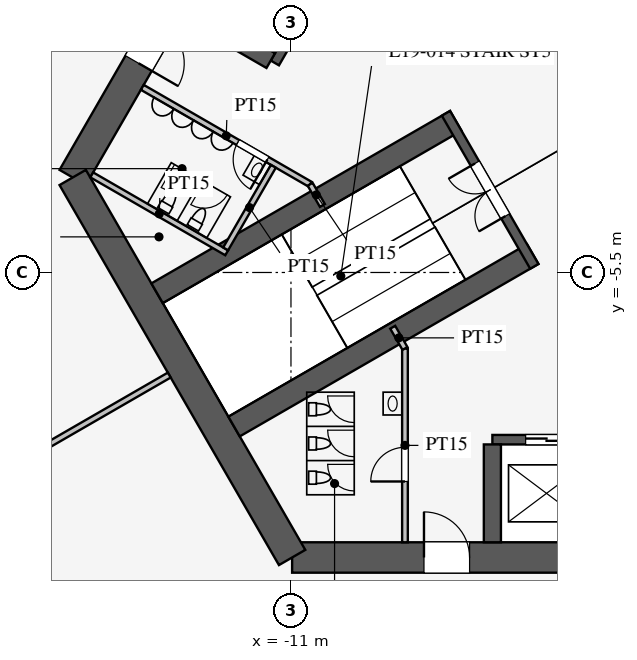
"""IFC4 building model, lengths in metres.
Left out: names, types, materials, properties, quantities, classifications, styles, units other than length and angle.
Written with IfcOpenShell. Run it as: python <this file> out.ifc"""

import sys

from ifc_helpers import new_model, si_unit, direction, frame, frame_2d, origin, place, context, subcontext, project, spatial, rectangle, extrude, element, fill, save


model = new_model("IFC4")
c1 = context("Model", 3, precision=1e-05, world=origin(), true_north=direction((0.0, 1.0)))
c2 = subcontext(c1, "Body", "Model", "MODEL_VIEW")
j1 = project(units=[si_unit("LENGTHUNIT", "METRE"), si_unit("PLANEANGLEUNIT", "RADIAN")], contexts=[c1])
p1 = place(None, origin())
s1 = spatial("IfcSite", under=j1, at=p1, CompositionType="ELEMENT")
p2 = place(p1, origin())
s2 = spatial("IfcBuilding", under=s1, at=p2, CompositionType="ELEMENT")
p3 = place(p2, frame((0.0, 0.0, 83.7)))
s3 = spatial("IfcBuildingStorey", under=s2, at=p3, CompositionType="ELEMENT", Elevation=83.7)
p4 = place(p3, frame((-10.97, -13.0, 0.0), z_axis=(0.0, 0.0, 1.0), x_axis=(1.0, 0.0, 0.0)))
e1 = element("IfcWall", 1, at=p4, inside=s3, PredefinedType="SHEAR", context=c2, shape_type="SweptSolid", body=[
    extrude(rectangle(XDim=21.939, YDim=0.8, at=frame_2d((10.97, 0.0))), origin(), (0.0, 0.0, 1.0), 4.2),
])
p5 = place(p4, frame((17.27, 0.0, 0.0)))
e2 = element("IfcOpeningElement", 2, at=p5, cuts=e1, PredefinedType="OPENING", context=c2, shape_type="SweptSolid", body=[
    extrude(rectangle(XDim=1.2, YDim=2.1, at=frame_2d((0.6, 1.05))), frame((0.0, 0.41, 0.0), z_axis=(0.0, -1.0, 0.0), x_axis=(1.0, 0.0, 0.0)), (0.0, 0.0, 1.0), 0.82),
])
p6 = place(p4, frame((3.47, 0.0, 0.0)))
e3 = element("IfcOpeningElement", 3, at=p6, cuts=e1, PredefinedType="OPENING", context=c2, shape_type="SweptSolid", body=[
    extrude(rectangle(XDim=1.2, YDim=2.1, at=frame_2d((0.6, 1.05))), frame((0.0, 0.41, 0.0), z_axis=(0.0, -1.0, 0.0), x_axis=(1.0, 0.0, 0.0)), (0.0, 0.0, 1.0), 0.82),
])
p7 = place(p3, frame((-5.773, 16.0, 0.0), z_axis=(0.0, 0.0, 1.0), x_axis=(-0.500002442456, -0.866023993627, 0.0)))
e4 = element("IfcWall", 4, at=p7, inside=s3, PredefinedType="SHEAR", context=c2, shape_type="SweptSolid", body=[
    extrude(rectangle(XDim=21.939, YDim=0.8, at=frame_2d((10.97, 0.0))), origin(), (0.0, 0.0, 1.0), 4.2),
])
p8 = place(p7, frame((17.27, 0.0, 0.0)))
e5 = element("IfcOpeningElement", 5, at=p8, cuts=e4, PredefinedType="OPENING", context=c2, shape_type="SweptSolid", body=[
    extrude(rectangle(XDim=1.2, YDim=2.1, at=frame_2d((0.6, 1.05))), frame((0.0, 0.41, 0.0), z_axis=(0.0, -1.0, 0.0), x_axis=(1.0, 0.0, 0.0)), (0.0, 0.0, 1.0), 0.82),
])
p9 = place(p7, frame((3.47, 0.0, 0.0)))
e6 = element("IfcOpeningElement", 6, at=p9, cuts=e4, PredefinedType="OPENING", context=c2, shape_type="SweptSolid", body=[
    extrude(rectangle(XDim=1.2, YDim=2.1, at=frame_2d((0.6, 1.05))), frame((0.0, 0.41, 0.0), z_axis=(0.0, -1.0, 0.0), x_axis=(1.0, 0.0, 0.0)), (0.0, 0.0, 1.0), 0.82),
])
p10 = place(p3, frame((-16.743, -3.0, 0.0), z_axis=(0.0, 0.0, 1.0), x_axis=(0.499995765644, -0.866027848477, 0.0)))
e7 = element("IfcWall", 7, at=p10, inside=s3, PredefinedType="SHEAR", context=c2, shape_type="SweptSolid", body=[
    extrude(rectangle(XDim=11.547, YDim=0.8, at=frame_2d((5.773, 0.0))), origin(), (0.0, 0.0, 1.0), 4.2),
])
p11 = place(p3, frame((-5.7, -9.9, 0.0), z_axis=(0.0, 0.0, 1.0), x_axis=(1.0, 0.0, 0.0)))
e8 = element("IfcWall", 8, at=p11, inside=s3, PredefinedType="SHEAR", context=c2, shape_type="SweptSolid", body=[
    extrude(rectangle(XDim=11.4, YDim=0.25, at=frame_2d((5.7, 0.0))), origin(), (0.0, 0.0, 1.0), 4.2),
])
p12 = place(p11, frame((0.875, 0.0, 0.0)))
e9 = element("IfcOpeningElement", 9, at=p12, cuts=e8, PredefinedType="OPENING", context=c2, shape_type="SweptSolid", body=[
    extrude(rectangle(XDim=1.1, YDim=2.2, at=frame_2d((0.55, 1.1))), frame((0.0, 0.135, 0.0), z_axis=(0.0, -1.0, 0.0), x_axis=(1.0, 0.0, 0.0)), (0.0, 0.0, 1.0), 0.27),
])
p13 = place(p11, frame((3.725, 0.0, 0.0)))
e10 = element("IfcOpeningElement", 10, at=p13, cuts=e8, PredefinedType="OPENING", context=c2, shape_type="SweptSolid", body=[
    extrude(rectangle(XDim=1.1, YDim=2.2, at=frame_2d((0.55, 1.1))), frame((0.0, 0.135, 0.0), z_axis=(0.0, -1.0, 0.0), x_axis=(1.0, 0.0, 0.0)), (0.0, 0.0, 1.0), 0.27),
])
p14 = place(p11, frame((6.575, 0.0, 0.0)))
e11 = element("IfcOpeningElement", 11, at=p14, cuts=e8, PredefinedType="OPENING", context=c2, shape_type="SweptSolid", body=[
    extrude(rectangle(XDim=1.1, YDim=2.2, at=frame_2d((0.55, 1.1))), frame((0.0, 0.135, 0.0), z_axis=(0.0, -1.0, 0.0), x_axis=(1.0, 0.0, 0.0)), (0.0, 0.0, 1.0), 0.27),
])
p15 = place(p11, frame((9.425, 0.0, 0.0)))
e12 = element("IfcOpeningElement", 12, at=p15, cuts=e8, PredefinedType="OPENING", context=c2, shape_type="SweptSolid", body=[
    extrude(rectangle(XDim=1.1, YDim=2.2, at=frame_2d((0.55, 1.1))), frame((0.0, 0.135, 0.0), z_axis=(0.0, -1.0, 0.0), x_axis=(1.0, 0.0, 0.0)), (0.0, 0.0, 1.0), 0.27),
])
p16 = place(p3, frame((-5.7, -10.025, 0.0), z_axis=(0.0, 0.0, 1.0), x_axis=(0.0, -1.0, 0.0)))
e13 = element("IfcWall", 13, at=p16, inside=s3, PredefinedType="SHEAR", context=c2, shape_type="SweptSolid", body=[
    extrude(rectangle(XDim=2.575, YDim=0.45, at=frame_2d((1.288, 0.0))), origin(), (0.0, 0.0, 1.0), 4.2),
])
p17 = place(p3, frame((-5.724, 9.886, 0.0), z_axis=(0.0, 0.0, 1.0), x_axis=(-0.500001763848, -0.866024385424, 0.0)))
e14 = element("IfcWall", 14, at=p17, inside=s3, PredefinedType="SHEAR", context=c2, shape_type="SweptSolid", body=[
    extrude(rectangle(XDim=11.4, YDim=0.25, at=frame_2d((5.7, 0.0))), origin(), (0.0, 0.0, 1.0), 4.2),
])
p18 = place(p17, frame((6.525, 0.0, 0.0)))
e15 = element("IfcOpeningElement", 15, at=p18, cuts=e14, PredefinedType="OPENING", context=c2, shape_type="SweptSolid", body=[
    extrude(rectangle(XDim=1.2, YDim=2.2, at=frame_2d((0.6, 1.1))), frame((0.0, 0.135, 0.0), z_axis=(0.0, -1.0, 0.0), x_axis=(1.0, 0.0, 0.0)), (0.0, 0.0, 1.0), 0.27),
])
p19 = place(p17, frame((9.375, 0.0, 0.0)))
e16 = element("IfcOpeningElement", 16, at=p19, cuts=e14, PredefinedType="OPENING", context=c2, shape_type="SweptSolid", body=[
    extrude(rectangle(XDim=1.2, YDim=2.2, at=frame_2d((0.6, 1.1))), frame((0.0, 0.135, 0.0), z_axis=(0.0, -1.0, 0.0), x_axis=(1.0, 0.0, 0.0)), (0.0, 0.0, 1.0), 0.27),
])
p20 = place(p3, frame((-11.532, 0.076, 0.0), z_axis=(0.0, 0.0, 1.0), x_axis=(-0.866005588531, 0.500034319456, 0.0)))
e17 = element("IfcWall", 17, at=p20, inside=s3, PredefinedType="SHEAR", context=c2, shape_type="SweptSolid", body=[
    extrude(rectangle(XDim=2.575, YDim=0.45, at=frame_2d((1.288, 0.0))), origin(), (0.0, 0.0, 1.0), 4.2),
])
for number, where, z_axis, x_axis in (
    (18, (-6.663, -1.509, 0.0), (0.0, 0.0, 1.0), (-0.866, -0.5, 0.0)),
    (19, (-4.638, -5.016, 0.0), (0.0, 0.0, 1.0), (-0.866, -0.5, 0.0)),
):
    element("IfcWall", number, at=place(p3, frame(where, z_axis=z_axis, x_axis=x_axis)), inside=s3, PredefinedType="SHEAR", context=c2, shape_type="SweptSolid", body=[
        extrude(rectangle(XDim=9.075, YDim=0.6, at=frame_2d((4.538, 0.0))), origin(), (0.0, 0.0, 1.0), 4.2),
    ])
p21 = place(p3, frame((-6.922, -1.312, 0.0), z_axis=(0.0, 0.0, 1.0), x_axis=(0.499984536904, -0.866034331223, 0.0)))
e20 = element("IfcWall", 20, at=p21, inside=s3, PredefinedType="SHEAR", context=c2, shape_type="SweptSolid", body=[
    extrude(rectangle(XDim=4.65, YDim=0.25, at=frame_2d((2.325, 0.0))), origin(), (0.0, 0.0, 1.0), 4.2),
])
p22 = place(p21, frame((1.525, 0.0, 0.0)))
e21 = element("IfcOpeningElement", 21, at=p22, cuts=e20, PredefinedType="OPENING", context=c2, shape_type="SweptSolid", body=[
    extrude(rectangle(XDim=1.6, YDim=2.1, at=frame_2d((0.8, 1.05))), frame((0.0, 0.135, 0.0), z_axis=(0.0, -1.0, 0.0), x_axis=(1.0, 0.0, 0.0)), (0.0, 0.0, 1.0), 0.27),
])
p23 = place(p3, frame((-8.0, -7.5, 0.0), z_axis=(0.0, 0.0, 1.0), x_axis=(0.0, -1.0, 0.0)))
e22 = element("IfcWall", 22, at=p23, inside=s3, PredefinedType="PARTITIONING", context=c2, shape_type="SweptSolid", body=[
    extrude(rectangle(XDim=5.1, YDim=0.15, at=frame_2d((2.55, 0.0))), origin(), (0.0, 0.0, 1.0), 4.0),
])
p24 = place(p23, frame((2.6, 0.0, 0.0)))
e23 = element("IfcOpeningElement", 23, at=p24, cuts=e22, PredefinedType="OPENING", context=c2, shape_type="SweptSolid", body=[
    extrude(rectangle(XDim=0.9, YDim=2.1, at=frame_2d((0.45, 1.05))), frame((0.0, 0.085, 0.0), z_axis=(0.0, -1.0, 0.0), x_axis=(1.0, 0.0, 0.0)), (0.0, 0.0, 1.0), 0.17),
])
p25 = place(p3, frame((-10.495, -3.178, 0.0), z_axis=(0.0, 0.0, 1.0), x_axis=(-0.86602216432, 0.500005610874, 0.0)))
e24 = element("IfcWall", 24, at=p25, inside=s3, PredefinedType="PARTITIONING", context=c2, shape_type="SweptSolid", body=[
    extrude(rectangle(XDim=5.1, YDim=0.15, at=frame_2d((2.55, 0.0))), origin(), (0.0, 0.0, 1.0), 4.0),
])
p26 = place(p25, frame((1.3, 0.0, 0.0)))
e25 = element("IfcOpeningElement", 25, at=p26, cuts=e24, PredefinedType="OPENING", context=c2, shape_type="SweptSolid", body=[
    extrude(rectangle(XDim=0.9, YDim=2.1, at=frame_2d((0.45, 1.05))), frame((0.0, 0.085, 0.0), z_axis=(0.0, -1.0, 0.0), x_axis=(1.0, 0.0, 0.0)), (0.0, 0.0, 1.0), 0.17),
])
for number, where, z_axis, x_axis in (
    (26, (-10.495, -3.178, 0.0), (0.0, 0.0, 1.0), (0.5, -0.866, 0.0)),
    (27, (-8.0, -7.5, 0.0), (0.0, 0.0, 1.0), (-0.5, 0.866, 0.0)),
):
    element("IfcWall", number, at=place(p3, frame(where, z_axis=z_axis, x_axis=x_axis)), inside=s3, PredefinedType="PARTITIONING", context=c2, shape_type="SweptSolid", body=[
        extrude(rectangle(XDim=0.645, YDim=0.15, at=frame_2d((0.323, 0.0))), origin(), (0.0, 0.0, 1.0), 4.0),
    ])
p27 = place(p3, frame((-12.691, -4.982, 0.0), z_axis=(0.0, 0.0, 1.0), x_axis=(-0.8660249478, 0.500000789788, 0.0)))
e28 = element("IfcWall", 28, at=p27, inside=s3, PredefinedType="PARTITIONING", context=c2, shape_type="SweptSolid", body=[
    extrude(rectangle(XDim=4.1, YDim=0.15, at=frame_2d((2.05, 0.0))), origin(), (0.0, 0.0, 1.0), 4.0),
])
p28 = place(p3, frame((-11.464, -2.706, 0.0), z_axis=(0.0, 0.0, 1.0), x_axis=(-0.50001992892, -0.866013897511, 0.0)))
e29 = element("IfcWall", 29, at=p28, inside=s3, PredefinedType="PARTITIONING", context=c2, shape_type="SweptSolid", body=[
    extrude(rectangle(XDim=2.51, YDim=0.15, at=frame_2d((1.255, 0.0))), origin(), (0.0, 0.0, 1.0), 4.0),
])
p29 = place(p3, frame((-14.203, -8.2, 0.0), z_axis=(0.0, 0.0, 1.0), x_axis=(-0.866024965723, -0.500000758745, 0.0)))
e30 = element("IfcWall", 30, at=p29, inside=s3, PredefinedType="PARTITIONING", context=c2, shape_type="SweptSolid", body=[
    extrude(rectangle(XDim=18.25, YDim=0.15, at=frame_2d((9.125, 0.0))), origin(), (0.0, 0.0, 1.0), 2.3),
])
p30 = place(p24, frame((0.9, 0.0, 0.0), z_axis=(0.0, 0.0, 1.0), x_axis=(-1.0, 0.0, 0.0)))
e31 = element("IfcDoor", 31, at=p30, inside=s3, OperationType="SINGLE_SWING_LEFT", PredefinedType="DOOR", context=c2, shape_type="SweptSolid", body=[
    extrude(rectangle(XDim=0.9, YDim=2.1, at=frame_2d((0.45, 1.05))), frame((0.0, 0.025, 0.0), z_axis=(0.0, -1.0, 0.0), x_axis=(1.0, 0.0, 0.0)), (0.0, 0.0, 1.0), 0.05),
])
fill(e23, e31)
p31 = place(p26, origin())
e32 = element("IfcDoor", 32, at=p31, inside=s3, OperationType="SINGLE_SWING_LEFT", PredefinedType="DOOR", context=c2, shape_type="SweptSolid", body=[
    extrude(rectangle(XDim=0.9, YDim=2.1, at=frame_2d((0.45, 1.05))), frame((0.0, 0.025, 0.0), z_axis=(0.0, -1.0, 0.0), x_axis=(1.0, 0.0, 0.0)), (0.0, 0.0, 1.0), 0.05),
])
fill(e25, e32)
p32 = place(p22, frame((1.6, 0.0, 0.0), z_axis=(0.0, 0.0, 1.0), x_axis=(-1.0, 0.0, 0.0)))
e33 = element("IfcDoor", 33, at=p32, inside=s3, OperationType="DOUBLE_DOOR_SINGLE_SWING", PredefinedType="DOOR", context=c2, shape_type="SweptSolid", body=[
    extrude(rectangle(XDim=1.6, YDim=2.1, at=frame_2d((0.8, 1.05))), frame((0.0, 0.025, 0.0), z_axis=(0.0, -1.0, 0.0), x_axis=(1.0, 0.0, 0.0)), (0.0, 0.0, 1.0), 0.05),
])
fill(e21, e33)
p33 = place(p6, origin())
e34 = element("IfcDoor", 34, at=p33, inside=s3, OperationType="SINGLE_SWING_LEFT", PredefinedType="DOOR", context=c2, shape_type="SweptSolid", body=[
    extrude(rectangle(XDim=1.2, YDim=2.1, at=frame_2d((0.6, 1.05))), frame((0.0, 0.025, 0.0), z_axis=(0.0, -1.0, 0.0), x_axis=(1.0, 0.0, 0.0)), (0.0, 0.0, 1.0), 0.05),
])
fill(e3, e34)
p34 = place(p8, origin())
e35 = element("IfcDoor", 35, at=p34, inside=s3, OperationType="SINGLE_SWING_RIGHT", PredefinedType="DOOR", context=c2, shape_type="SweptSolid", body=[
    extrude(rectangle(XDim=1.2, YDim=2.1, at=frame_2d((0.6, 1.05))), frame((0.0, 0.025, 0.0), z_axis=(0.0, -1.0, 0.0), x_axis=(1.0, 0.0, 0.0)), (0.0, 0.0, 1.0), 0.05),
])
fill(e5, e35)
p35 = place(p12, origin())
e36 = element("IfcDoor", 36, at=p35, inside=s3, OperationType="DOUBLE_DOOR_SLIDING", PredefinedType="DOOR", context=c2, shape_type="SweptSolid", body=[
    extrude(rectangle(XDim=1.1, YDim=2.2, at=frame_2d((0.55, 1.1))), frame((0.0, 0.025, 0.0), z_axis=(0.0, -1.0, 0.0), x_axis=(1.0, 0.0, 0.0)), (0.0, 0.0, 1.0), 0.05),
])
fill(e9, e36)
save(model, sys.argv[1])
